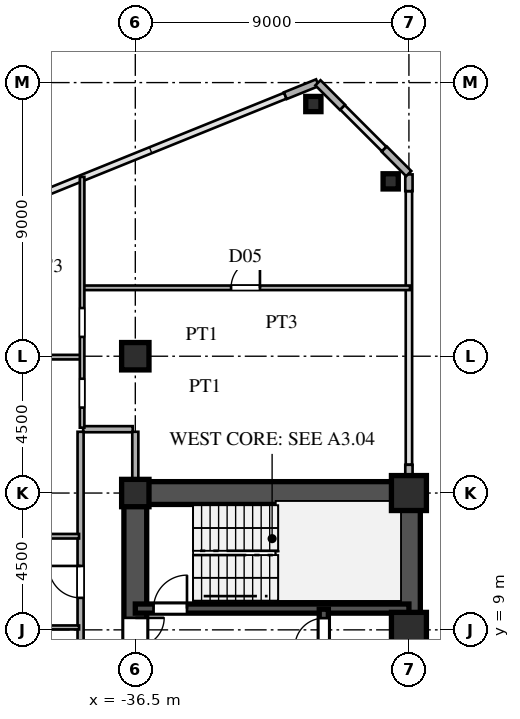
"""IFC4 building model, lengths in metres.
Left out: names, types, materials, properties, quantities, classifications, styles, units other than length and angle.
Written with IfcOpenShell. Run it as: python <this file> out.ifc"""

import sys

from ifc_helpers import new_model, si_unit, direction, frame, frame_2d, origin, origin_2d, place, context, subcontext, project, spatial, rectangle, hollow_rectangle, i_section, extrude, source, transform, mapped, element, fill, save


model = new_model("IFC4")
c1 = context("Model", 3, precision=1e-05, world=origin(), true_north=direction((0.0, 1.0)))
c2 = subcontext(c1, "Body", "Model", "MODEL_VIEW")
j1 = project(units=[si_unit("LENGTHUNIT", "METRE"), si_unit("PLANEANGLEUNIT", "RADIAN")], contexts=[c1])
p1 = place(None, origin())
s1 = spatial("IfcSite", under=j1, at=p1, CompositionType="ELEMENT")
p2 = place(p1, origin())
s2 = spatial("IfcBuilding", under=s1, at=p2, CompositionType="ELEMENT")
p3 = place(p2, frame((0.0, 0.0, 51.3)))
s3 = spatial("IfcBuildingStorey", under=s2, at=p3, CompositionType="ELEMENT", Elevation=51.3)
m1 = source(origin(), c2, "Body", "SweptSolid", [
    extrude(hollow_rectangle(XDim=1.15, YDim=1.15, WallThickness=0.048, at=origin_2d()), origin(), (0.0, 0.0, 1.0), 3.6),
])
for number, where, z_axis, x_axis in (
    (1, (-27.5, 9.0, 0.0), (0.0, 0.0, 1.0), (1.0, 0.0, 0.0)),
    (2, (-27.5, 13.5, 0.0), (0.0, 0.0, 1.0), (1.0, 0.0, 0.0)),
):
    element("IfcColumn", number, at=place(p3, frame(where, z_axis=z_axis, x_axis=x_axis)), inside=s3, PredefinedType="COLUMN", context=c2, shape_type="MappedRepresentation", body=[
        mapped(m1, transform((0.0, 0.0, 0.0), scale=1.0)),
    ])
m2 = source(origin(), c2, "Body", "SweptSolid", [
    extrude(i_section(OverallWidth=0.9, OverallDepth=0.9, WebThickness=0.036, FlangeThickness=0.055, at=origin_2d()), origin(), (0.0, 0.0, 1.0), 3.6),
])
for number, where, z_axis, x_axis in (
    (3, (-36.5, 13.5, 0.0), (0.0, 0.0, 1.0), (1.0, 0.0, 0.0)),
    (4, (-36.5, 18.0, 0.0), (0.0, 0.0, 1.0), (1.0, 0.0, 0.0)),
):
    element("IfcColumn", number, at=place(p3, frame(where, z_axis=z_axis, x_axis=x_axis)), inside=s3, PredefinedType="COLUMN", context=c2, shape_type="MappedRepresentation", body=[
        mapped(m2, transform((0.0, 0.0, 0.0), scale=1.0)),
    ])
m3 = source(origin(), c2, "Body", "SweptSolid", [
    extrude(hollow_rectangle(XDim=0.5, YDim=0.5, WallThickness=0.02, at=origin_2d()), origin(), (0.0, 0.0, 1.0), 3.6),
])
for number, where, z_axis, x_axis in (
    (5, (-28.1, 23.751, 0.0), (0.0, 0.0, 1.0), (1.0, 0.0, 0.0)),
    (6, (-30.643, 26.295, 0.0), (0.0, 0.0, 1.0), (1.0, 0.0, 0.0)),
):
    element("IfcColumn", number, at=place(p3, frame(where, z_axis=z_axis, x_axis=x_axis)), inside=s3, PredefinedType="COLUMN", context=c2, shape_type="MappedRepresentation", body=[
        mapped(m3, transform((0.0, 0.0, 0.0), scale=1.0)),
    ])
p4 = place(p3, frame((-27.5, 13.88, 0.0), z_axis=(0.0, 0.0, 1.0), x_axis=(0.0, 1.0, 0.0)))
e7 = element("IfcWall", 7, at=p4, inside=s3, PredefinedType="SOLIDWALL", context=c2, shape_type="SweptSolid", body=[
    extrude(rectangle(XDim=0.55, YDim=0.24, at=frame_2d((0.275, 0.0))), origin(), (0.0, 0.0, 1.0), 2.88),
])
p5 = place(p3, frame((-27.5, 23.43, 0.0), z_axis=(0.0, 0.0, 1.0), x_axis=(0.0, 1.0, 0.0)))
e8 = element("IfcWall", 8, at=p5, inside=s3, PredefinedType="SOLIDWALL", context=c2, shape_type="SweptSolid", body=[
    extrude(rectangle(XDim=0.55, YDim=0.24, at=frame_2d((0.275, 0.0))), origin(), (0.0, 0.0, 1.0), 3.38),
])
for number, where, z_axis, x_axis in (
    (9, (-27.507, 24.007, 0.0), (0.0, 0.0, 1.0), (-0.707, 0.707, 0.0)),
    (10, (-29.687, 26.187, 0.0), (0.0, 0.0, 1.0), (-0.707, 0.707, 0.0)),
):
    element("IfcWall", number, at=place(p3, frame(where, z_axis=z_axis, x_axis=x_axis)), inside=s3, PredefinedType="SOLIDWALL", context=c2, shape_type="SweptSolid", body=[
        extrude(rectangle(XDim=1.14, YDim=0.24, at=frame_2d((0.57, 0.0))), origin(), (0.0, 0.0, 1.0), 3.38),
    ])
p6 = place(p3, frame((-30.509, 26.996, 0.0), z_axis=(0.0, 0.0, 1.0), x_axis=(-0.927007103665, -0.375043770452, 0.0)))
e11 = element("IfcWall", 11, at=p6, inside=s3, PredefinedType="SOLIDWALL", context=c2, shape_type="SweptSolid", body=[
    extrude(rectangle(XDim=1.14, YDim=0.24, at=frame_2d((0.57, 0.0))), origin(), (0.0, 0.0, 1.0), 3.38),
])
p7 = place(p3, frame((-27.5, 1.3, 0.0), z_axis=(0.0, 0.0, 1.0), x_axis=(0.0, 1.0, 0.0)))
e12 = element("IfcWall", 12, at=p7, inside=s3, PredefinedType="SHEAR", context=c2, shape_type="SweptSolid", body=[
    extrude(rectangle(XDim=12.2, YDim=0.75, at=frame_2d((6.1, 0.0))), origin(), (0.0, 0.0, 1.0), 3.38),
])
p8 = place(p3, frame((-36.5, 13.5, 0.0), z_axis=(0.0, 0.0, 1.0), x_axis=(1.0, 0.0, 0.0)))
e13 = element("IfcWall", 13, at=p8, inside=s3, PredefinedType="SHEAR", context=c2, shape_type="SweptSolid", body=[
    extrude(rectangle(XDim=9.0, YDim=0.75, at=frame_2d((4.5, 0.0))), origin(), (0.0, 0.0, 1.0), 3.38),
])
p9 = place(p3, frame((-36.5, 8.2, 0.0), z_axis=(0.0, 0.0, 1.0), x_axis=(0.0, 1.0, 0.0)))
e14 = element("IfcWall", 14, at=p9, inside=s3, PredefinedType="SHEAR", context=c2, shape_type="SweptSolid", body=[
    extrude(rectangle(XDim=5.45, YDim=0.75, at=frame_2d((2.725, 0.0))), origin(), (0.0, 0.0, 1.0), 3.38),
])
p10 = place(p9, frame((0.245, 0.0, 0.0)))
e15 = element("IfcOpeningElement", 15, at=p10, cuts=e14, PredefinedType="OPENING", context=c2, shape_type="SweptSolid", body=[
    extrude(rectangle(XDim=0.95, YDim=2.15, at=frame_2d((0.475, 1.075))), frame((0.0, 0.385, 0.0), z_axis=(0.0, -1.0, 0.0), x_axis=(1.0, 0.0, 0.0)), (0.0, 0.0, 1.0), 0.77),
])
p11 = place(p3, frame((-36.5, 9.7, 0.0), z_axis=(0.0, 0.0, 1.0), x_axis=(1.0, 0.0, 0.0)))
e16 = element("IfcWall", 16, at=p11, inside=s3, PredefinedType="SHEAR", context=c2, shape_type="SweptSolid", body=[
    extrude(rectangle(XDim=9.0, YDim=0.3, at=frame_2d((4.5, 0.0))), origin(), (0.0, 0.0, 1.0), 3.38),
])
p12 = place(p11, frame((0.6, 0.0, 0.0)))
e17 = element("IfcOpeningElement", 17, at=p12, cuts=e16, PredefinedType="OPENING", context=c2, shape_type="SweptSolid", body=[
    extrude(rectangle(XDim=1.1, YDim=2.2, at=frame_2d((0.55, 1.1))), frame((0.0, 0.16, 0.0), z_axis=(0.0, -1.0, 0.0), x_axis=(1.0, 0.0, 0.0)), (0.0, 0.0, 1.0), 0.32),
])
p13 = place(p3, frame((-30.3, 8.15, 0.0), z_axis=(0.0, 0.0, 1.0), x_axis=(0.0, 1.0, 0.0)))
e18 = element("IfcWall", 18, at=p13, inside=s3, PredefinedType="SHEAR", context=c2, shape_type="SweptSolid", body=[
    extrude(rectangle(XDim=1.53, YDim=0.3, at=frame_2d((0.765, 0.0))), origin(), (0.0, 0.0, 1.0), 3.38),
])
p14 = place(p13, frame((0.285, 0.0, 0.0)))
e19 = element("IfcOpeningElement", 19, at=p14, cuts=e18, PredefinedType="OPENING", context=c2, shape_type="SweptSolid", body=[
    extrude(rectangle(XDim=0.95, YDim=2.15, at=frame_2d((0.475, 1.075))), frame((0.0, 0.16, 0.0), z_axis=(0.0, -1.0, 0.0), x_axis=(1.0, 0.0, 0.0)), (0.0, 0.0, 1.0), 0.32),
])
p15 = place(p3, frame((-44.45, 9.08, 0.0), z_axis=(0.0, 0.0, 1.0), x_axis=(1.0, 0.0, 0.0)))
e20 = element("IfcWall", 20, at=p15, inside=s3, PredefinedType="PARTITIONING", context=c2, shape_type="SweptSolid", body=[
    extrude(rectangle(XDim=6.1, YDim=0.13, at=frame_2d((3.05, 0.0))), origin(), (0.0, 0.0, 1.0), 3.38),
])
p16 = place(p15, frame((2.61, 0.0, 0.0)))
e21 = element("IfcOpeningElement", 21, at=p16, cuts=e20, PredefinedType="OPENING", context=c2, shape_type="SweptSolid", body=[
    extrude(rectangle(XDim=0.88, YDim=2.1, at=frame_2d((0.44, 1.05))), frame((0.0, 0.075, 0.0), z_axis=(0.0, -1.0, 0.0), x_axis=(1.0, 0.0, 0.0)), (0.0, 0.0, 1.0), 0.15),
])
p17 = place(p3, frame((-44.45, 12.08, 0.0), z_axis=(0.0, 0.0, 1.0), x_axis=(1.0, 0.0, 0.0)))
e22 = element("IfcWall", 22, at=p17, inside=s3, PredefinedType="PARTITIONING", context=c2, shape_type="SweptSolid", body=[
    extrude(rectangle(XDim=6.1, YDim=0.15, at=frame_2d((3.05, 0.0))), origin(), (0.0, 0.0, 1.0), 3.38),
])
p18 = place(p17, frame((2.575, 0.0, 0.0)))
e23 = element("IfcOpeningElement", 23, at=p18, cuts=e22, PredefinedType="OPENING", context=c2, shape_type="SweptSolid", body=[
    extrude(rectangle(XDim=0.95, YDim=2.15, at=frame_2d((0.475, 1.075))), frame((0.0, 0.085, 0.0), z_axis=(0.0, -1.0, 0.0), x_axis=(1.0, 0.0, 0.0)), (0.0, 0.0, 1.0), 0.17),
])
p19 = place(p3, frame((-38.215, 15.6, 0.0), z_axis=(0.0, 0.0, 1.0), x_axis=(1.0, 0.0, 0.0)))
e24 = element("IfcWall", 24, at=p19, inside=s3, PredefinedType="PARTITIONING", context=c2, shape_type="SweptSolid", body=[
    extrude(rectangle(XDim=1.63, YDim=0.2, at=frame_2d((0.815, 0.0))), origin(), (0.0, 0.0, 1.0), 3.38),
])
p20 = place(p3, frame((-44.45, 17.97, 0.0), z_axis=(0.0, 0.0, 1.0), x_axis=(1.0, 0.0, 0.0)))
e25 = element("IfcWall", 25, at=p20, inside=s3, PredefinedType="PARTITIONING", context=c2, shape_type="SweptSolid", body=[
    extrude(rectangle(XDim=6.15, YDim=0.15, at=frame_2d((3.075, 0.0))), origin(), (0.0, 0.0, 1.0), 3.38),
])
p21 = place(p3, frame((-38.2, 20.25, 0.0), z_axis=(0.0, 0.0, 1.0), x_axis=(1.0, 0.0, 0.0)))
e26 = element("IfcWall", 26, at=p21, inside=s3, PredefinedType="PARTITIONING", context=c2, shape_type="SweptSolid", body=[
    extrude(rectangle(XDim=10.735, YDim=0.15, at=frame_2d((5.367, 0.0))), origin(), (0.0, 0.0, 1.0), 3.38),
])
p22 = place(p21, frame((4.85, 0.0, 0.0)))
e27 = element("IfcOpeningElement", 27, at=p22, cuts=e26, PredefinedType="OPENING", context=c2, shape_type="SweptSolid", body=[
    extrude(rectangle(XDim=0.95, YDim=2.15, at=frame_2d((0.475, 1.075))), frame((0.0, 0.085, 0.0), z_axis=(0.0, -1.0, 0.0), x_axis=(1.0, 0.0, 0.0)), (0.0, 0.0, 1.0), 0.17),
])
p23 = place(p3, frame((-38.3, -15.515, 0.0), z_axis=(0.0, 0.0, 1.0), x_axis=(0.0, 1.0, 0.0)))
e28 = element("IfcWall", 28, at=p23, inside=s3, PredefinedType="PARTITIONING", context=c2, shape_type="SweptSolid", body=[
    extrude(rectangle(XDim=31.03, YDim=0.2, at=frame_2d((15.515, 0.0))), origin(), (0.0, 0.0, 1.0), 3.38),
])
p24 = place(p23, frame((2.345, 0.0, 0.0)))
e29 = element("IfcOpeningElement", 29, at=p24, cuts=e28, PredefinedType="OPENING", context=c2, shape_type="SweptSolid", body=[
    extrude(rectangle(XDim=1.05, YDim=2.25, at=frame_2d((0.525, 1.125))), frame((0.0, 0.11, 0.0), z_axis=(0.0, -1.0, 0.0), x_axis=(1.0, 0.0, 0.0)), (0.0, 0.0, 1.0), 0.22),
])
p25 = place(p23, frame((13.28, 0.0, 0.0)))
e30 = element("IfcOpeningElement", 30, at=p25, cuts=e28, PredefinedType="OPENING", context=c2, shape_type="SweptSolid", body=[
    extrude(rectangle(XDim=1.05, YDim=2.25, at=frame_2d((0.525, 1.125))), frame((0.0, 0.11, 0.0), z_axis=(0.0, -1.0, 0.0), x_axis=(1.0, 0.0, 0.0)), (0.0, 0.0, 1.0), 0.22),
])
p26 = place(p23, frame((25.567, 0.0, 0.0)))
e31 = element("IfcOpeningElement", 31, at=p26, cuts=e28, PredefinedType="OPENING", context=c2, shape_type="SweptSolid", body=[
    extrude(rectangle(XDim=1.05, YDim=2.25, at=frame_2d((0.525, 1.125))), frame((0.0, 0.11, 0.0), z_axis=(0.0, -1.0, 0.0), x_axis=(1.0, 0.0, 0.0)), (0.0, 0.0, 1.0), 0.22),
])
p27 = place(p3, frame((-38.25, 15.65, 0.0), z_axis=(0.0, 0.0, 1.0), x_axis=(0.0, 1.0, 0.0)))
e32 = element("IfcWall", 32, at=p27, inside=s3, PredefinedType="PARTITIONING", context=c2, shape_type="SweptSolid", body=[
    extrude(rectangle(XDim=8.248, YDim=0.15, at=frame_2d((4.124, 0.0))), origin(), (0.0, 0.0, 1.0), 3.38),
])
p28 = place(p27, frame((0.66, 0.0, 0.0)))
e33 = element("IfcOpeningElement", 33, at=p28, cuts=e32, PredefinedType="OPENING", context=c2, shape_type="SweptSolid", body=[
    extrude(rectangle(XDim=0.95, YDim=2.15, at=frame_2d((0.475, 1.075))), frame((0.0, 0.085, 0.0), z_axis=(0.0, -1.0, 0.0), x_axis=(1.0, 0.0, 0.0)), (0.0, 0.0, 1.0), 0.17),
])
p29 = place(p27, frame((2.985, 0.0, 0.0)))
e34 = element("IfcOpeningElement", 34, at=p29, cuts=e32, PredefinedType="OPENING", context=c2, shape_type="SweptSolid", body=[
    extrude(rectangle(XDim=0.95, YDim=2.15, at=frame_2d((0.475, 1.075))), frame((0.0, 0.085, 0.0), z_axis=(0.0, -1.0, 0.0), x_axis=(1.0, 0.0, 0.0)), (0.0, 0.0, 1.0), 0.17),
])
p30 = place(p3, frame((-36.5, 13.88, 0.0), z_axis=(0.0, 0.0, 1.0), x_axis=(0.0, 1.0, 0.0)))
e35 = element("IfcWall", 35, at=p30, inside=s3, PredefinedType="PARTITIONING", context=c2, shape_type="SweptSolid", body=[
    extrude(rectangle(XDim=1.635, YDim=0.2, at=frame_2d((0.817, 0.0))), origin(), (0.0, 0.0, 1.0), 2.68),
])
m4 = source(origin(), c2, "Body", "SweptSolid", [
    extrude(rectangle(XDim=0.95, YDim=2.15, at=frame_2d((0.475, 1.075))), frame((0.0, 0.025, 0.0), z_axis=(0.0, -1.0, 0.0), x_axis=(1.0, 0.0, 0.0)), (0.0, 0.0, 1.0), 0.05),
])
p31 = place(p10, frame((0.95, 0.0, 0.0), z_axis=(0.0, 0.0, 1.0), x_axis=(-1.0, 0.0, 0.0)))
e36 = element("IfcDoor", 36, at=p31, inside=s3, OperationType="SINGLE_SWING_RIGHT", PredefinedType="DOOR", context=c2, shape_type="MappedRepresentation", body=[
    mapped(m4, transform((0.0, 0.0, 0.0), scale=1.0)),
])
fill(e15, e36)
m5 = source(origin(), c2, "Body", "SweptSolid", [
    extrude(rectangle(XDim=1.1, YDim=2.2, at=frame_2d((0.55, 1.1))), frame((0.0, 0.025, 0.0), z_axis=(0.0, -1.0, 0.0), x_axis=(1.0, 0.0, 0.0)), (0.0, 0.0, 1.0), 0.05),
])
p32 = place(p12, origin())
e37 = element("IfcDoor", 37, at=p32, inside=s3, OperationType="SINGLE_SWING_RIGHT", PredefinedType="DOOR", context=c2, shape_type="MappedRepresentation", body=[
    mapped(m5, transform((0.0, 0.0, 0.0), scale=1.0)),
])
fill(e17, e37)
p33 = place(p14, origin())
e38 = element("IfcDoor", 38, at=p33, inside=s3, OperationType="SINGLE_SWING_LEFT", PredefinedType="DOOR", context=c2, shape_type="MappedRepresentation", body=[
    mapped(m4, transform((0.0, 0.0, 0.0), scale=1.0)),
])
fill(e19, e38)
m6 = source(origin(), c2, "Body", "SweptSolid", [
    extrude(rectangle(XDim=0.95, YDim=2.15, at=frame_2d((0.475, 1.075))), frame((0.0, 0.025, 0.0), z_axis=(0.0, -1.0, 0.0), x_axis=(1.0, 0.0, 0.0)), (0.0, 0.0, 1.0), 0.05),
])
p34 = place(p22, origin())
e39 = element("IfcDoor", 39, at=p34, inside=s3, OperationType="SINGLE_SWING_RIGHT", PredefinedType="DOOR", context=c2, shape_type="MappedRepresentation", body=[
    mapped(m6, transform((0.0, 0.0, 0.0), scale=1.0)),
])
fill(e27, e39)
m7 = source(origin(), c2, "Body", "SweptSolid", [
    extrude(rectangle(XDim=1.05, YDim=2.25, at=frame_2d((0.525, 1.125))), frame((0.0, 0.025, 0.0), z_axis=(0.0, -1.0, 0.0), x_axis=(1.0, 0.0, 0.0)), (0.0, 0.0, 1.0), 0.05),
])
p35 = place(p26, origin())
e40 = element("IfcDoor", 40, at=p35, inside=s3, OperationType="SINGLE_SWING_RIGHT", PredefinedType="DOOR", context=c2, shape_type="MappedRepresentation", body=[
    mapped(m7, transform((0.0, 0.0, 0.0), scale=1.0)),
])
fill(e31, e40)
save(model, sys.argv[1])
